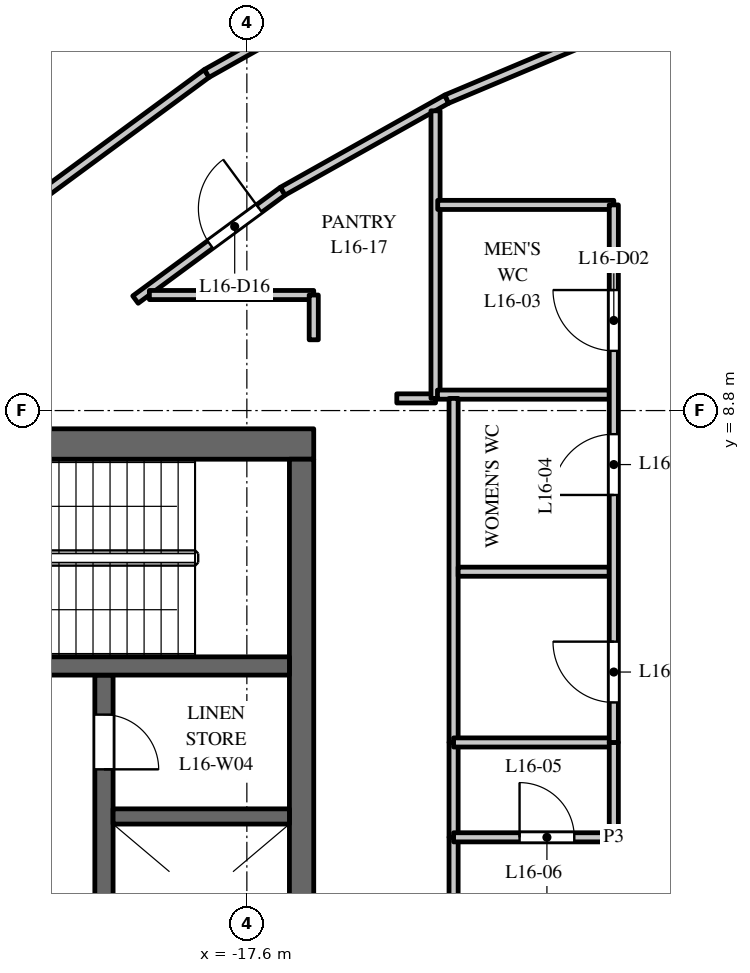
"""IFC4 building model, lengths in metres.
Left out: names, types, materials, properties, quantities, classifications, styles, units other than length and angle.
Written with IfcOpenShell. Run it as: python <this file> out.ifc"""

import sys

from ifc_helpers import new_model, si_unit, direction, frame, frame_2d, origin, place, context, subcontext, project, spatial, rectangle, extrude, element, fill, save


model = new_model("IFC4")
c1 = context("Model", 3, precision=1e-05, world=origin(), true_north=direction((0.0, 1.0)))
c2 = subcontext(c1, "Body", "Model", "MODEL_VIEW")
j1 = project(units=[si_unit("LENGTHUNIT", "METRE"), si_unit("PLANEANGLEUNIT", "RADIAN")], contexts=[c1])
p1 = place(None, origin())
s1 = spatial("IfcSite", under=j1, at=p1, CompositionType="ELEMENT")
p2 = place(p1, origin())
s2 = spatial("IfcBuilding", under=s1, at=p2, CompositionType="ELEMENT")
p3 = place(p2, frame((0.0, 0.0, 74.5)))
s3 = spatial("IfcBuildingStorey", under=s2, at=p3, CompositionType="ELEMENT", Elevation=74.5)
p4 = place(p3, frame((-16.5, 8.25, 0.0), z_axis=(0.0, 0.0, 1.0), x_axis=(-1.0, 0.0, 0.0)))
e1 = element("IfcWall", 1, at=p4, inside=s3, PredefinedType="SHEAR", context=c2, shape_type="SweptSolid", body=[
    extrude(rectangle(XDim=15.0, YDim=0.5, at=frame_2d((7.5, 0.0))), origin(), (0.0, 0.0, 1.0), 3.7),
])
p5 = place(p4, frame((6.9, 0.0, 0.0)))
e2 = element("IfcOpeningElement", 2, at=p5, cuts=e1, PredefinedType="OPENING", context=c2, shape_type="SweptSolid", body=[
    extrude(rectangle(XDim=1.2, YDim=2.1, at=frame_2d((0.6, 1.05))), frame((0.0, 0.26, 0.0), z_axis=(0.0, -1.0, 0.0), x_axis=(1.0, 0.0, 0.0)), (0.0, 0.0, 1.0), 0.52),
])
p6 = place(p4, frame((12.275, 0.0, 0.0)))
e3 = element("IfcOpeningElement", 3, at=p6, cuts=e1, PredefinedType="OPENING", context=c2, shape_type="SweptSolid", body=[
    extrude(rectangle(XDim=0.9, YDim=2.1, at=frame_2d((0.45, 1.05))), frame((0.0, 0.26, 0.0), z_axis=(0.0, -1.0, 0.0), x_axis=(1.0, 0.0, 0.0)), (0.0, 0.0, 1.0), 0.52),
])
p7 = place(p3, frame((-19.95, -4.45, 0.0), z_axis=(0.0, 0.0, 1.0), x_axis=(0.0, 1.0, 0.0)))
e4 = element("IfcWall", 4, at=p7, inside=s3, PredefinedType="SHEAR", context=c2, shape_type="SweptSolid", body=[
    extrude(rectangle(XDim=8.9, YDim=0.3, at=frame_2d((4.45, 0.0))), origin(), (0.0, 0.0, 1.0), 3.7),
])
p8 = place(p7, frame((0.775, 0.0, 0.0)))
e5 = element("IfcOpeningElement", 5, at=p8, cuts=e4, PredefinedType="OPENING", context=c2, shape_type="SweptSolid", body=[
    extrude(rectangle(XDim=1.2, YDim=2.1, at=frame_2d((0.6, 1.05))), frame((0.0, 0.16, 0.0), z_axis=(0.0, -1.0, 0.0), x_axis=(1.0, 0.0, 0.0)), (0.0, 0.0, 1.0), 0.32),
])
p9 = place(p7, frame((7.35, 0.0, 0.0)))
e6 = element("IfcOpeningElement", 6, at=p9, cuts=e4, PredefinedType="OPENING", context=c2, shape_type="SweptSolid", body=[
    extrude(rectangle(XDim=0.9, YDim=2.1, at=frame_2d((0.45, 1.05))), frame((0.0, 0.16, 0.0), z_axis=(0.0, -1.0, 0.0), x_axis=(1.0, 0.0, 0.0)), (0.0, 0.0, 1.0), 0.32),
])
p10 = place(p3, frame((-16.7, -8.0, 0.0), z_axis=(0.0, 0.0, 1.0), x_axis=(0.0, 1.0, 0.0)))
e7 = element("IfcWall", 7, at=p10, inside=s3, PredefinedType="SHEAR", context=c2, shape_type="SweptSolid", body=[
    extrude(rectangle(XDim=16.0, YDim=0.4, at=frame_2d((8.0, 0.0))), origin(), (0.0, 0.0, 1.0), 3.7),
])
p11 = place(p3, frame((-16.9, 2.125, 0.0), z_axis=(0.0, 0.0, 1.0), x_axis=(-1.0, 0.0, 0.0)))
e8 = element("IfcWall", 8, at=p11, inside=s3, PredefinedType="SHEAR", context=c2, shape_type="SweptSolid", body=[
    extrude(rectangle(XDim=2.9, YDim=0.25, at=frame_2d((1.45, 0.0))), origin(), (0.0, 0.0, 1.0), 3.7),
])
p12 = place(p3, frame((-16.9, 4.6, 0.0), z_axis=(0.0, 0.0, 1.0), x_axis=(-1.0, 0.0, 0.0)))
e9 = element("IfcWall", 9, at=p12, inside=s3, PredefinedType="SHEAR", context=c2, shape_type="SweptSolid", body=[
    extrude(rectangle(XDim=6.18, YDim=0.3, at=frame_2d((3.09, 0.0))), origin(), (0.0, 0.0, 1.0), 3.7),
])
p13 = place(p12, frame((4.9, 0.0, 0.0)))
e10 = element("IfcOpeningElement", 10, at=p13, cuts=e9, PredefinedType="OPENING", context=c2, shape_type="SweptSolid", body=[
    extrude(rectangle(XDim=1.1, YDim=2.1, at=frame_2d((0.55, 1.05))), frame((0.0, 0.16, 0.0), z_axis=(0.0, -1.0, 0.0), x_axis=(1.0, 0.0, 0.0)), (0.0, 0.0, 1.0), 0.32),
])
p14 = place(p3, frame((-20.891, 12.407, 0.0), z_axis=(0.0, 0.0, 1.0), x_axis=(0.805303685339, 0.592862525701, 0.0)))
e11 = element("IfcWall", 11, at=p14, inside=s3, PredefinedType="PARTITIONING", context=c2, shape_type="SweptSolid", body=[
    extrude(rectangle(XDim=3.267, YDim=0.15, at=frame_2d((1.634, 0.0))), origin(), (0.0, 0.0, 1.0), 2.75),
])
p15 = place(p3, frame((-19.432, 10.625, 0.0), z_axis=(0.0, 0.0, 1.0), x_axis=(0.805306738654, 0.592858378265, 0.0)))
e12 = element("IfcWall", 12, at=p15, inside=s3, PredefinedType="PARTITIONING", context=c2, shape_type="SweptSolid", body=[
    extrude(rectangle(XDim=3.007, YDim=0.15, at=frame_2d((1.504, 0.0))), origin(), (0.0, 0.0, 1.0), 2.75),
])
p16 = place(p15, frame((1.527, 0.0, 0.0)))
e13 = element("IfcOpeningElement", 13, at=p16, cuts=e12, PredefinedType="OPENING", context=c2, shape_type="SweptSolid", body=[
    extrude(rectangle(XDim=1.0, YDim=2.1, at=frame_2d((0.5, 1.05))), frame((0.0, 0.085, 0.0), z_axis=(0.0, -1.0, 0.0), x_axis=(1.0, 0.0, 0.0)), (0.0, 0.0, 1.0), 0.17),
])
p17 = place(p3, frame((-19.203, 10.7, 0.0), z_axis=(0.0, 0.0, 1.0), x_axis=(1.0, 0.0, 0.0)))
e14 = element("IfcWall", 14, at=p17, inside=s3, PredefinedType="PARTITIONING", context=c2, shape_type="SweptSolid", body=[
    extrude(rectangle(XDim=2.703, YDim=0.15, at=frame_2d((1.352, 0.0))), origin(), (0.0, 0.0, 1.0), 3.7),
])
p18 = place(p3, frame((-18.26, 14.344, 0.0), z_axis=(0.0, 0.0, 1.0), x_axis=(0.871958798398, 0.489579262118, 0.0)))
e15 = element("IfcWall", 15, at=p18, inside=s3, PredefinedType="PARTITIONING", context=c2, shape_type="SweptSolid", body=[
    extrude(rectangle(XDim=3.366, YDim=0.15, at=frame_2d((1.683, 0.0))), origin(), (0.0, 0.0, 1.0), 3.7),
])
p19 = place(p3, frame((-17.01, 12.408, 0.0), z_axis=(0.0, 0.0, 1.0), x_axis=(0.871977874087, 0.489545286059, 0.0)))
e16 = element("IfcWall", 16, at=p19, inside=s3, PredefinedType="PARTITIONING", context=c2, shape_type="SweptSolid", body=[
    extrude(rectangle(XDim=3.093, YDim=0.15, at=frame_2d((1.546, 0.0))), origin(), (0.0, 0.0, 1.0), 3.7),
])
p20 = place(p3, frame((-16.5, 9.964, 0.0), z_axis=(0.0, 0.0, 1.0), x_axis=(0.0, 1.0, 0.0)))
e17 = element("IfcWall", 17, at=p20, inside=s3, PredefinedType="PARTITIONING", context=c2, shape_type="SweptSolid", body=[
    extrude(rectangle(XDim=0.736, YDim=0.15, at=frame_2d((0.368, 0.0))), origin(), (0.0, 0.0, 1.0), 3.7),
])
p21 = place(p3, frame((-15.134, 9.0, 0.0), z_axis=(0.0, 0.0, 1.0), x_axis=(1.0, 0.0, 0.0)))
e18 = element("IfcWall", 18, at=p21, inside=s3, PredefinedType="PARTITIONING", context=c2, shape_type="SweptSolid", body=[
    extrude(rectangle(XDim=0.637, YDim=0.15, at=frame_2d((0.318, 0.0))), origin(), (0.0, 0.0, 1.0), 3.7),
])
p22 = place(p3, frame((-14.497, 9.0, 0.0), z_axis=(0.0, 0.0, 1.0), x_axis=(0.0, 1.0, 0.0)))
e19 = element("IfcWall", 19, at=p22, inside=s3, PredefinedType="PARTITIONING", context=c2, shape_type="SweptSolid", body=[
    extrude(rectangle(XDim=4.729, YDim=0.15, at=frame_2d((2.365, 0.0))), origin(), (0.0, 0.0, 1.0), 2.75),
])
p23 = place(p3, frame((-14.465, 9.062, 0.0), z_axis=(0.0, 0.0, 1.0), x_axis=(1.0, 0.0, 0.0)))
e20 = element("IfcWall", 20, at=p23, inside=s3, PredefinedType="PARTITIONING", context=c2, shape_type="SweptSolid", body=[
    extrude(rectangle(XDim=2.825, YDim=0.15, at=frame_2d((1.413, 0.0))), origin(), (0.0, 0.0, 1.0), 2.75),
])
p24 = place(p3, frame((-14.461, 12.182, 0.0), z_axis=(0.0, 0.0, 1.0), x_axis=(1.0, 0.0, 0.0)))
e21 = element("IfcWall", 21, at=p24, inside=s3, PredefinedType="PARTITIONING", context=c2, shape_type="SweptSolid", body=[
    extrude(rectangle(XDim=2.896, YDim=0.15, at=frame_2d((1.448, 0.0))), origin(), (0.0, 0.0, 1.0), 3.7),
])
p25 = place(p3, frame((-14.313, 13.922, 0.0), z_axis=(0.0, 0.0, 1.0), x_axis=(0.921799502591, 0.387666966638, 0.0)))
e22 = element("IfcWall", 22, at=p25, inside=s3, PredefinedType="PARTITIONING", context=c2, shape_type="SweptSolid", body=[
    extrude(rectangle(XDim=3.19, YDim=0.15, at=frame_2d((1.595, 0.0))), origin(), (0.0, 0.0, 1.0), 2.85),
])
p26 = place(p3, frame((-14.2, -9.0, 0.0), z_axis=(0.0, 0.0, 1.0), x_axis=(0.0, 1.0, 0.0)))
e23 = element("IfcWall", 23, at=p26, inside=s3, PredefinedType="PARTITIONING", context=c2, shape_type="SweptSolid", body=[
    extrude(rectangle(XDim=10.782, YDim=0.15, at=frame_2d((5.391, 0.0))), origin(), (0.0, 0.0, 1.0), 3.7),
])
p27 = place(p26, frame((0.65, 0.0, 0.0)))
e24 = element("IfcOpeningElement", 24, at=p27, cuts=e23, PredefinedType="OPENING", context=c2, shape_type="SweptSolid", body=[
    extrude(rectangle(XDim=1.0, YDim=2.1, at=frame_2d((0.5, 1.05))), frame((0.0, 0.085, 0.0), z_axis=(0.0, -1.0, 0.0), x_axis=(1.0, 0.0, 0.0)), (0.0, 0.0, 1.0), 0.17),
])
p28 = place(p3, frame((-14.2, 1.782, 0.0), z_axis=(0.0, 0.0, 1.0), x_axis=(0.0, 1.0, 0.0)))
e25 = element("IfcWall", 25, at=p28, inside=s3, PredefinedType="PARTITIONING", context=c2, shape_type="SweptSolid", body=[
    extrude(rectangle(XDim=1.56, YDim=0.15, at=frame_2d((0.78, 0.0))), origin(), (0.0, 0.0, 1.0), 3.7),
])
p29 = place(p3, frame((-14.2, 1.782, 0.0), z_axis=(0.0, 0.0, 1.0), x_axis=(1.0, 0.0, 0.0)))
e26 = element("IfcWall", 26, at=p29, inside=s3, PredefinedType="PARTITIONING", context=c2, shape_type="SweptSolid", body=[
    extrude(rectangle(XDim=2.635, YDim=0.15, at=frame_2d((1.317, 0.0))), origin(), (0.0, 0.0, 1.0), 3.7),
])
p30 = place(p29, frame((1.085, 0.0, 0.0)))
e27 = element("IfcOpeningElement", 27, at=p30, cuts=e26, PredefinedType="OPENING", context=c2, shape_type="SweptSolid", body=[
    extrude(rectangle(XDim=0.9, YDim=2.1, at=frame_2d((0.45, 1.05))), frame((0.0, 0.085, 0.0), z_axis=(0.0, -1.0, 0.0), x_axis=(1.0, 0.0, 0.0)), (0.0, 0.0, 1.0), 0.17),
])
p31 = place(p3, frame((-14.2, 3.342, 0.0), z_axis=(0.0, 0.0, 1.0), x_axis=(0.0, 1.0, 0.0)))
e28 = element("IfcWall", 28, at=p31, inside=s3, PredefinedType="PARTITIONING", context=c2, shape_type="SweptSolid", body=[
    extrude(rectangle(XDim=5.658, YDim=0.15, at=frame_2d((2.829, 0.0))), origin(), (0.0, 0.0, 1.0), 3.7),
])
p32 = place(p3, frame((-14.2, 3.342, 0.0), z_axis=(0.0, 0.0, 1.0), x_axis=(1.0, 0.0, 0.0)))
e29 = element("IfcWall", 29, at=p32, inside=s3, PredefinedType="PARTITIONING", context=c2, shape_type="SweptSolid", body=[
    extrude(rectangle(XDim=2.635, YDim=0.15, at=frame_2d((1.317, 0.0))), origin(), (0.0, 0.0, 1.0), 3.7),
])
p33 = place(p3, frame((-14.125, 6.15, 0.0), z_axis=(0.0, 0.0, 1.0), x_axis=(1.0, 0.0, 0.0)))
e30 = element("IfcWall", 30, at=p33, inside=s3, PredefinedType="PARTITIONING", context=c2, shape_type="SweptSolid", body=[
    extrude(rectangle(XDim=2.485, YDim=0.15, at=frame_2d((1.243, 0.0))), origin(), (0.0, 0.0, 1.0), 3.7),
])
p34 = place(p3, frame((-11.565, 1.782, 0.0), z_axis=(0.0, 0.0, 1.0), x_axis=(0.0, 1.0, 0.0)))
e31 = element("IfcWall", 31, at=p34, inside=s3, PredefinedType="PARTITIONING", context=c2, shape_type="SweptSolid", body=[
    extrude(rectangle(XDim=1.56, YDim=0.15, at=frame_2d((0.78, 0.0))), origin(), (0.0, 0.0, 1.0), 3.7),
])
p35 = place(p3, frame((-11.565, 3.342, 0.0), z_axis=(0.0, 0.0, 1.0), x_axis=(0.0, 1.0, 0.0)))
e32 = element("IfcWall", 32, at=p35, inside=s3, PredefinedType="PARTITIONING", context=c2, shape_type="SweptSolid", body=[
    extrude(rectangle(XDim=8.84, YDim=0.15, at=frame_2d((4.42, 0.0))), origin(), (0.0, 0.0, 1.0), 2.75),
])
p36 = place(p35, frame((6.44, 0.0, 0.0)))
e33 = element("IfcOpeningElement", 33, at=p36, cuts=e32, PredefinedType="OPENING", context=c2, shape_type="SweptSolid", body=[
    extrude(rectangle(XDim=1.0, YDim=2.1, at=frame_2d((0.5, 1.05))), frame((0.0, 0.085, 0.0), z_axis=(0.0, -1.0, 0.0), x_axis=(1.0, 0.0, 0.0)), (0.0, 0.0, 1.0), 0.17),
])
p37 = place(p35, frame((4.07, 0.0, 0.0)))
e34 = element("IfcOpeningElement", 34, at=p37, cuts=e32, PredefinedType="OPENING", context=c2, shape_type="SweptSolid", body=[
    extrude(rectangle(XDim=1.0, YDim=2.1, at=frame_2d((0.5, 1.05))), frame((0.0, 0.085, 0.0), z_axis=(0.0, -1.0, 0.0), x_axis=(1.0, 0.0, 0.0)), (0.0, 0.0, 1.0), 0.17),
])
p38 = place(p35, frame((0.658, 0.0, 0.0)))
e35 = element("IfcOpeningElement", 35, at=p38, cuts=e32, PredefinedType="OPENING", context=c2, shape_type="SweptSolid", body=[
    extrude(rectangle(XDim=1.0, YDim=2.1, at=frame_2d((0.5, 1.05))), frame((0.0, 0.085, 0.0), z_axis=(0.0, -1.0, 0.0), x_axis=(1.0, 0.0, 0.0)), (0.0, 0.0, 1.0), 0.17),
])
p39 = place(p9, origin())
e36 = element("IfcDoor", 36, at=p39, inside=s3, OperationType="SINGLE_SWING_LEFT", PredefinedType="DOOR", context=c2, shape_type="SweptSolid", body=[
    extrude(rectangle(XDim=0.9, YDim=2.1, at=frame_2d((0.45, 1.05))), frame((0.0, 0.025, 0.0), z_axis=(0.0, -1.0, 0.0), x_axis=(1.0, 0.0, 0.0)), (0.0, 0.0, 1.0), 0.05),
])
fill(e6, e36)
p40 = place(p36, origin())
e37 = element("IfcDoor", 37, at=p40, inside=s3, OperationType="SINGLE_SWING_RIGHT", PredefinedType="DOOR", context=c2, shape_type="SweptSolid", body=[
    extrude(rectangle(XDim=1.0, YDim=2.1, at=frame_2d((0.5, 1.05))), frame((0.0, 0.025, 0.0), z_axis=(0.0, -1.0, 0.0), x_axis=(1.0, 0.0, 0.0)), (0.0, 0.0, 1.0), 0.05),
])
fill(e33, e37)
p41 = place(p37, origin())
e38 = element("IfcDoor", 38, at=p41, inside=s3, OperationType="SINGLE_SWING_LEFT", PredefinedType="DOOR", context=c2, shape_type="SweptSolid", body=[
    extrude(rectangle(XDim=1.0, YDim=2.1, at=frame_2d((0.5, 1.05))), frame((0.0, 0.025, 0.0), z_axis=(0.0, -1.0, 0.0), x_axis=(1.0, 0.0, 0.0)), (0.0, 0.0, 1.0), 0.05),
])
fill(e34, e38)
p42 = place(p38, origin())
e39 = element("IfcDoor", 39, at=p42, inside=s3, OperationType="SINGLE_SWING_RIGHT", PredefinedType="DOOR", context=c2, shape_type="SweptSolid", body=[
    extrude(rectangle(XDim=1.0, YDim=2.1, at=frame_2d((0.5, 1.05))), frame((0.0, 0.025, 0.0), z_axis=(0.0, -1.0, 0.0), x_axis=(1.0, 0.0, 0.0)), (0.0, 0.0, 1.0), 0.05),
])
fill(e35, e39)
p43 = place(p30, origin())
e40 = element("IfcDoor", 40, at=p43, inside=s3, OperationType="SINGLE_SWING_LEFT", PredefinedType="DOOR", context=c2, shape_type="SweptSolid", body=[
    extrude(rectangle(XDim=0.9, YDim=2.1, at=frame_2d((0.45, 1.05))), frame((0.0, 0.025, 0.0), z_axis=(0.0, -1.0, 0.0), x_axis=(1.0, 0.0, 0.0)), (0.0, 0.0, 1.0), 0.05),
])
fill(e27, e40)
p44 = place(p16, origin())
e41 = element("IfcDoor", 41, at=p44, inside=s3, OperationType="SINGLE_SWING_RIGHT", PredefinedType="DOOR", context=c2, shape_type="SweptSolid", body=[
    extrude(rectangle(XDim=1.0, YDim=2.1, at=frame_2d((0.5, 1.05))), frame((0.0, 0.025, 0.0), z_axis=(0.0, -1.0, 0.0), x_axis=(1.0, 0.0, 0.0)), (0.0, 0.0, 1.0), 0.05),
])
fill(e13, e41)
save(model, sys.argv[1])
